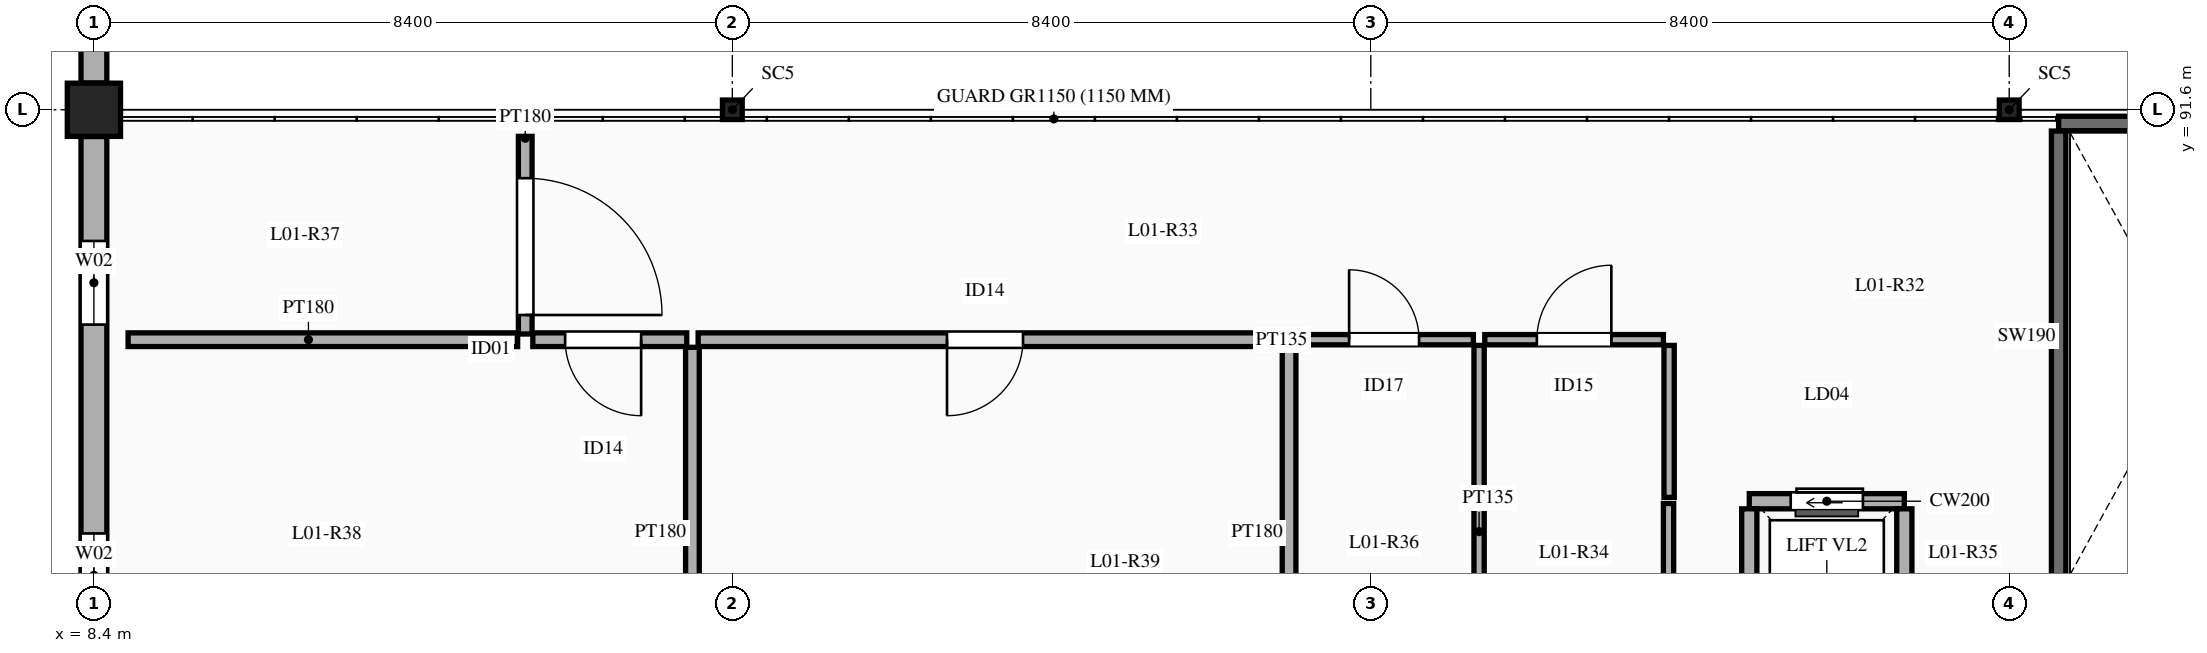
"""IFC4 building model, lengths in metres.
Left out: names, types, materials, properties, quantities, classifications, styles, units other than length and angle.
Written with IfcOpenShell. Run it as: python <this file> out.ifc"""

import sys

from ifc_helpers import new_model, si_unit, direction, frame, frame_2d, origin, origin_2d, place, context, subcontext, project, spatial, rectangle, i_section, extrude, element, fill, save


model = new_model("IFC4")
c1 = context("Model", 3, precision=1e-05, world=origin(), true_north=direction((0.0, 1.0)))
c2 = subcontext(c1, "Body", "Model", "MODEL_VIEW")
j1 = project(units=[si_unit("LENGTHUNIT", "METRE"), si_unit("PLANEANGLEUNIT", "RADIAN")], contexts=[c1])
p1 = place(None, origin())
s1 = spatial("IfcSite", under=j1, at=p1, CompositionType="ELEMENT")
p2 = place(p1, origin())
s2 = spatial("IfcBuilding", under=s1, at=p2, CompositionType="ELEMENT")
p3 = place(p2, frame((0.0, 0.0, 5.4)))
s3 = spatial("IfcBuildingStorey", under=s2, at=p3, CompositionType="ELEMENT", Elevation=5.4)
p4 = place(p3, frame((8.4, 91.6, 0.0), z_axis=(0.0, 0.0, 1.0), x_axis=(1.0, 0.0, 0.0)))
e1 = element("IfcColumn", 1, at=p4, inside=s3, PredefinedType="COLUMN", context=c2, shape_type="SweptSolid", body=[
    extrude(rectangle(XDim=0.7, YDim=0.7, at=origin_2d()), origin(), (0.0, 0.0, 1.0), 4.8),
])
for number, where, z_axis, x_axis in (
    (2, (16.8, 91.6, 0.0), (0.0, 0.0, 1.0), (1.0, 0.0, 0.0)),
    (3, (33.6, 91.6, 0.0), (0.0, 0.0, 1.0), (1.0, 0.0, 0.0)),
):
    element("IfcColumn", number, at=place(p3, frame(where, z_axis=z_axis, x_axis=x_axis)), inside=s3, PredefinedType="COLUMN", context=c2, shape_type="SweptSolid", body=[
        extrude(i_section(OverallWidth=0.256, OverallDepth=0.26, WebThickness=0.01, FlangeThickness=0.017, FilletRadius=0.013, at=origin_2d()), origin(), (0.0, 0.0, 1.0), 4.8),
    ])
p5 = place(p3, frame((8.4, 83.552, 0.0), z_axis=(0.0, 0.0, 1.0), x_axis=(0.0, 1.0, 0.0)))
e4 = element("IfcWall", 4, at=p5, inside=s3, PredefinedType="SOLIDWALL", context=c2, shape_type="SweptSolid", body=[
    extrude(rectangle(XDim=7.696, YDim=0.34, at=frame_2d((3.848, 0.0))), origin(), (0.0, 0.0, 1.0), 3.85),
])
p6 = place(p5, frame((1.374, 0.0, 0.9)))
e5 = element("IfcOpeningElement", 5, at=p6, cuts=e4, PredefinedType="OPENING", context=c2, shape_type="SweptSolid", body=[
    extrude(rectangle(XDim=1.1, YDim=1.95, at=frame_2d((0.55, 0.975))), frame((0.0, 0.18, 0.0), z_axis=(0.0, -1.0, 0.0), x_axis=(1.0, 0.0, 0.0)), (0.0, 0.0, 1.0), 0.36),
])
p7 = place(p5, frame((5.222, 0.0, 0.9)))
e6 = element("IfcOpeningElement", 6, at=p7, cuts=e4, PredefinedType="OPENING", context=c2, shape_type="SweptSolid", body=[
    extrude(rectangle(XDim=1.1, YDim=1.95, at=frame_2d((0.55, 0.975))), frame((0.0, 0.18, 0.0), z_axis=(0.0, -1.0, 0.0), x_axis=(1.0, 0.0, 0.0)), (0.0, 0.0, 1.0), 0.36),
])
p8 = place(p3, frame((8.4, 91.952, 0.0), z_axis=(0.0, 0.0, 1.0), x_axis=(0.0, 1.0, 0.0)))
e7 = element("IfcWall", 7, at=p8, inside=s3, PredefinedType="SOLIDWALL", context=c2, shape_type="SweptSolid", body=[
    extrude(rectangle(XDim=7.596, YDim=0.34, at=frame_2d((3.798, 0.0))), origin(), (0.0, 0.0, 1.0), 3.85),
])
p9 = place(p3, frame((30.18, 86.45, 0.0), z_axis=(0.0, 0.0, 1.0), x_axis=(1.0, 0.0, 0.0)))
e8 = element("IfcWall", 8, at=p9, inside=s3, PredefinedType="SOLIDWALL", context=c2, shape_type="SweptSolid", body=[
    extrude(rectangle(XDim=2.04, YDim=0.2, at=frame_2d((1.02, 0.0))), origin(), (0.0, 0.0, 1.0), 4.58),
])
p10 = place(p9, frame((0.545, 0.0, 0.0)))
e9 = element("IfcOpeningElement", 9, at=p10, cuts=e8, PredefinedType="OPENING", context=c2, shape_type="SweptSolid", body=[
    extrude(rectangle(XDim=0.95, YDim=2.15, at=frame_2d((0.475, 1.075))), frame((0.0, 0.11, 0.0), z_axis=(0.0, -1.0, 0.0), x_axis=(1.0, 0.0, 0.0)), (0.0, 0.0, 1.0), 0.22),
])
for number, where, z_axis, x_axis in (
    (10, (30.18, 84.45, 0.0), (0.0, 0.0, 1.0), (0.0, 1.0, 0.0)),
    (11, (32.22, 84.45, 0.0), (0.0, 0.0, 1.0), (0.0, 1.0, 0.0)),
):
    element("IfcWall", number, at=place(p3, frame(where, z_axis=z_axis, x_axis=x_axis)), inside=s3, PredefinedType="SOLIDWALL", context=c2, shape_type="SweptSolid", body=[
        extrude(rectangle(XDim=1.9, YDim=0.2, at=frame_2d((0.95, 0.0))), origin(), (0.0, 0.0, 1.0), 4.58),
    ])
p11 = place(p3, frame((34.25, 91.42, 0.0), z_axis=(0.0, 0.0, 1.0), x_axis=(1.0, 0.0, 0.0)))
e12 = element("IfcWall", 12, at=p11, inside=s3, PredefinedType="SOLIDWALL", context=c2, shape_type="SweptSolid", body=[
    extrude(rectangle(XDim=3.5, YDim=0.19, at=frame_2d((1.75, 0.0))), origin(), (0.0, 0.0, 1.0), 4.58),
])
p12 = place(p3, frame((34.25, 83.74, 0.0), z_axis=(0.0, 0.0, 1.0), x_axis=(0.0, 1.0, 0.0)))
e13 = element("IfcWall", 13, at=p12, inside=s3, PredefinedType="SOLIDWALL", context=c2, shape_type="SweptSolid", body=[
    extrude(rectangle(XDim=7.58, YDim=0.19, at=frame_2d((3.79, 0.0))), origin(), (0.0, 0.0, 1.0), 4.58),
])
p13 = place(p12, frame((0.6, 0.0, 0.0)))
e14 = element("IfcOpeningElement", 14, at=p13, cuts=e13, PredefinedType="OPENING", context=c2, shape_type="SweptSolid", body=[
    extrude(rectangle(XDim=1.08, YDim=2.15, at=frame_2d((0.54, 1.075))), frame((0.0, 0.105, 0.0), z_axis=(0.0, -1.0, 0.0), x_axis=(1.0, 0.0, 0.0)), (0.0, 0.0, 1.0), 0.21),
])
p14 = place(p3, frame((29.125, 86.5, 0.0), z_axis=(0.0, 0.0, 1.0), x_axis=(0.0, 1.0, 0.0)))
e15 = element("IfcWall", 15, at=p14, inside=s3, PredefinedType="PARTITIONING", context=c2, shape_type="SweptSolid", body=[
    extrude(rectangle(XDim=2.0, YDim=0.135, at=frame_2d((1.0, 0.0))), origin(), (0.0, 0.0, 1.0), 2.95),
])
p15 = place(p3, frame((26.7, 88.575, 0.0), z_axis=(0.0, 0.0, 1.0), x_axis=(1.0, 0.0, 0.0)))
e16 = element("IfcWall", 16, at=p15, inside=s3, PredefinedType="PARTITIONING", context=c2, shape_type="SweptSolid", body=[
    extrude(rectangle(XDim=2.35, YDim=0.135, at=frame_2d((1.175, 0.0))), origin(), (0.0, 0.0, 1.0), 2.95),
])
p16 = place(p15, frame((0.685, 0.0, 0.0)))
e17 = element("IfcOpeningElement", 17, at=p16, cuts=e16, PredefinedType="OPENING", context=c2, shape_type="SweptSolid", body=[
    extrude(rectangle(XDim=0.98, YDim=2.15, at=frame_2d((0.49, 1.075))), frame((0.0, 0.077, 0.0), z_axis=(0.0, -1.0, 0.0), x_axis=(1.0, 0.0, 0.0)), (0.0, 0.0, 1.0), 0.155),
])
p17 = place(p3, frame((24.2, 88.575, 0.0), z_axis=(0.0, 0.0, 1.0), x_axis=(1.0, 0.0, 0.0)))
e18 = element("IfcWall", 18, at=p17, inside=s3, PredefinedType="PARTITIONING", context=c2, shape_type="SweptSolid", body=[
    extrude(rectangle(XDim=2.35, YDim=0.135, at=frame_2d((1.175, 0.0))), origin(), (0.0, 0.0, 1.0), 2.95),
])
p18 = place(p17, frame((0.715, 0.0, 0.0)))
e19 = element("IfcOpeningElement", 19, at=p18, cuts=e18, PredefinedType="OPENING", context=c2, shape_type="SweptSolid", body=[
    extrude(rectangle(XDim=0.92, YDim=2.12, at=frame_2d((0.46, 1.06))), frame((0.0, 0.077, 0.0), z_axis=(0.0, -1.0, 0.0), x_axis=(1.0, 0.0, 0.0)), (0.0, 0.0, 1.0), 0.155),
])
p19 = place(p3, frame((14.075, 88.65, 0.0), z_axis=(0.0, 0.0, 1.0), x_axis=(0.0, 1.0, 0.0)))
e20 = element("IfcWall", 20, at=p19, inside=s3, PredefinedType="PARTITIONING", context=c2, shape_type="SweptSolid", body=[
    extrude(rectangle(XDim=2.6, YDim=0.18, at=frame_2d((1.3, 0.0))), origin(), (0.0, 0.0, 1.0), 2.95),
])
p20 = place(p19, frame((0.25, 0.0, 0.0)))
e21 = element("IfcOpeningElement", 21, at=p20, cuts=e20, PredefinedType="OPENING", context=c2, shape_type="SweptSolid", body=[
    extrude(rectangle(XDim=1.8, YDim=2.4, at=frame_2d((0.9, 1.2))), frame((0.0, 0.1, 0.0), z_axis=(0.0, -1.0, 0.0), x_axis=(1.0, 0.0, 0.0)), (0.0, 0.0, 1.0), 0.2),
])
p21 = place(p3, frame((14.175, 88.575, 0.0), z_axis=(0.0, 0.0, 1.0), x_axis=(1.0, 0.0, 0.0)))
e22 = element("IfcWall", 22, at=p21, inside=s3, PredefinedType="PARTITIONING", context=c2, shape_type="SweptSolid", body=[
    extrude(rectangle(XDim=2.025, YDim=0.18, at=frame_2d((1.012, 0.0))), origin(), (0.0, 0.0, 1.0), 2.95),
])
p22 = place(p21, frame((0.425, 0.0, 0.0)))
e23 = element("IfcOpeningElement", 23, at=p22, cuts=e22, PredefinedType="OPENING", context=c2, shape_type="SweptSolid", body=[
    extrude(rectangle(XDim=1.0, YDim=2.15, at=frame_2d((0.5, 1.075))), frame((0.0, 0.1, 0.0), z_axis=(0.0, -1.0, 0.0), x_axis=(1.0, 0.0, 0.0)), (0.0, 0.0, 1.0), 0.2),
])
p23 = place(p3, frame((16.35, 88.575, 0.0), z_axis=(0.0, 0.0, 1.0), x_axis=(1.0, 0.0, 0.0)))
e24 = element("IfcWall", 24, at=p23, inside=s3, PredefinedType="PARTITIONING", context=c2, shape_type="SweptSolid", body=[
    extrude(rectangle(XDim=7.7, YDim=0.18, at=frame_2d((3.85, 0.0))), origin(), (0.0, 0.0, 1.0), 2.95),
])
p24 = place(p23, frame((3.274, 0.0, 0.0)))
e25 = element("IfcOpeningElement", 25, at=p24, cuts=e24, PredefinedType="OPENING", context=c2, shape_type="SweptSolid", body=[
    extrude(rectangle(XDim=1.0, YDim=2.15, at=frame_2d((0.5, 1.075))), frame((0.0, 0.1, 0.0), z_axis=(0.0, -1.0, 0.0), x_axis=(1.0, 0.0, 0.0)), (0.0, 0.0, 1.0), 0.2),
])
p25 = place(p3, frame((26.625, 83.6, 0.0), z_axis=(0.0, 0.0, 1.0), x_axis=(0.0, 1.0, 0.0)))
e26 = element("IfcWall", 26, at=p25, inside=s3, PredefinedType="PARTITIONING", context=c2, shape_type="SweptSolid", body=[
    extrude(rectangle(XDim=4.9, YDim=0.135, at=frame_2d((2.45, 0.0))), origin(), (0.0, 0.0, 1.0), 2.95),
])
p26 = place(p3, frame((24.125, 83.6, 0.0), z_axis=(0.0, 0.0, 1.0), x_axis=(0.0, 1.0, 0.0)))
e27 = element("IfcWall", 27, at=p26, inside=s3, PredefinedType="PARTITIONING", context=c2, shape_type="SweptSolid", body=[
    extrude(rectangle(XDim=4.875, YDim=0.18, at=frame_2d((2.438, 0.0))), origin(), (0.0, 0.0, 1.0), 2.95),
])
p27 = place(p3, frame((8.85, 88.575, 0.0), z_axis=(0.0, 0.0, 1.0), x_axis=(1.0, 0.0, 0.0)))
e28 = element("IfcWall", 28, at=p27, inside=s3, PredefinedType="PARTITIONING", context=c2, shape_type="SweptSolid", body=[
    extrude(rectangle(XDim=5.125, YDim=0.18, at=frame_2d((2.562, 0.0))), origin(), (0.0, 0.0, 1.0), 2.95),
])
p28 = place(p3, frame((16.275, 83.6, 0.0), z_axis=(0.0, 0.0, 1.0), x_axis=(0.0, 1.0, 0.0)))
e29 = element("IfcWall", 29, at=p28, inside=s3, PredefinedType="PARTITIONING", context=c2, shape_type="SweptSolid", body=[
    extrude(rectangle(XDim=4.875, YDim=0.18, at=frame_2d((2.438, 0.0))), origin(), (0.0, 0.0, 1.0), 2.95),
])
p29 = place(p3, frame((29.117, 83.61, 0.0), z_axis=(0.0, 0.0, 1.0), x_axis=(0.0, 1.0, 0.0)))
e30 = element("IfcWall", 30, at=p29, inside=s3, PredefinedType="PARTITIONING", context=c2, shape_type="SweptSolid", body=[
    extrude(rectangle(XDim=2.81, YDim=0.135, at=frame_2d((1.405, 0.0))), origin(), (0.0, 0.0, 1.0), 2.95),
])
p30 = place(p6, origin())
e31 = element("IfcWindow", 31, at=p30, inside=s3, PartitioningType="SINGLE_PANEL", PredefinedType="WINDOW", context=c2, shape_type="SweptSolid", body=[
    extrude(rectangle(XDim=1.1, YDim=1.95, at=frame_2d((0.55, 0.975))), frame((0.0, 0.03, 0.0), z_axis=(0.0, -1.0, 0.0), x_axis=(1.0, 0.0, 0.0)), (0.0, 0.0, 1.0), 0.06),
])
fill(e5, e31)
p31 = place(p7, origin())
e32 = element("IfcWindow", 32, at=p31, inside=s3, PartitioningType="SINGLE_PANEL", PredefinedType="WINDOW", context=c2, shape_type="SweptSolid", body=[
    extrude(rectangle(XDim=1.1, YDim=1.95, at=frame_2d((0.55, 0.975))), frame((0.0, 0.03, 0.0), z_axis=(0.0, -1.0, 0.0), x_axis=(1.0, 0.0, 0.0)), (0.0, 0.0, 1.0), 0.06),
])
fill(e6, e32)
p32 = place(p10, origin())
e33 = element("IfcDoor", 33, at=p32, inside=s3, OperationType="SLIDING_TO_LEFT", PredefinedType="DOOR", context=c2, shape_type="SweptSolid", body=[
    extrude(rectangle(XDim=0.95, YDim=2.15, at=frame_2d((0.475, 1.075))), frame((0.0, 0.025, 0.0), z_axis=(0.0, -1.0, 0.0), x_axis=(1.0, 0.0, 0.0)), (0.0, 0.0, 1.0), 0.05),
])
fill(e9, e33)
p33 = place(p16, origin())
e34 = element("IfcDoor", 34, at=p33, inside=s3, OperationType="SINGLE_SWING_RIGHT", PredefinedType="DOOR", context=c2, shape_type="SweptSolid", body=[
    extrude(rectangle(XDim=0.98, YDim=2.15, at=frame_2d((0.49, 1.075))), frame((0.0, 0.025, 0.0), z_axis=(0.0, -1.0, 0.0), x_axis=(1.0, 0.0, 0.0)), (0.0, 0.0, 1.0), 0.05),
])
fill(e17, e34)
p34 = place(p18, origin())
e35 = element("IfcDoor", 35, at=p34, inside=s3, OperationType="SINGLE_SWING_LEFT", PredefinedType="DOOR", context=c2, shape_type="SweptSolid", body=[
    extrude(rectangle(XDim=0.92, YDim=2.12, at=frame_2d((0.46, 1.06))), frame((0.0, 0.025, 0.0), z_axis=(0.0, -1.0, 0.0), x_axis=(1.0, 0.0, 0.0)), (0.0, 0.0, 1.0), 0.05),
])
fill(e19, e35)
p35 = place(p20, frame((1.8, 0.0, 0.0), z_axis=(0.0, 0.0, 1.0), x_axis=(-1.0, 0.0, 0.0)))
e36 = element("IfcDoor", 36, at=p35, inside=s3, OperationType="SINGLE_SWING_RIGHT", PredefinedType="DOOR", context=c2, shape_type="SweptSolid", body=[
    extrude(rectangle(XDim=1.8, YDim=2.4, at=frame_2d((0.9, 1.2))), frame((0.0, 0.025, 0.0), z_axis=(0.0, -1.0, 0.0), x_axis=(1.0, 0.0, 0.0)), (0.0, 0.0, 1.0), 0.05),
])
fill(e21, e36)
p36 = place(p22, frame((1.0, 0.0, 0.0), z_axis=(0.0, 0.0, 1.0), x_axis=(-1.0, 0.0, 0.0)))
e37 = element("IfcDoor", 37, at=p36, inside=s3, OperationType="SINGLE_SWING_LEFT", PredefinedType="DOOR", context=c2, shape_type="SweptSolid", body=[
    extrude(rectangle(XDim=1.0, YDim=2.15, at=frame_2d((0.5, 1.075))), frame((0.0, 0.025, 0.0), z_axis=(0.0, -1.0, 0.0), x_axis=(1.0, 0.0, 0.0)), (0.0, 0.0, 1.0), 0.05),
])
fill(e23, e37)
p37 = place(p24, frame((1.0, 0.0, 0.0), z_axis=(0.0, 0.0, 1.0), x_axis=(-1.0, 0.0, 0.0)))
e38 = element("IfcDoor", 38, at=p37, inside=s3, OperationType="SINGLE_SWING_RIGHT", PredefinedType="DOOR", context=c2, shape_type="SweptSolid", body=[
    extrude(rectangle(XDim=1.0, YDim=2.15, at=frame_2d((0.5, 1.075))), frame((0.0, 0.025, 0.0), z_axis=(0.0, -1.0, 0.0), x_axis=(1.0, 0.0, 0.0)), (0.0, 0.0, 1.0), 0.05),
])
fill(e25, e38)
save(model, sys.argv[1])
